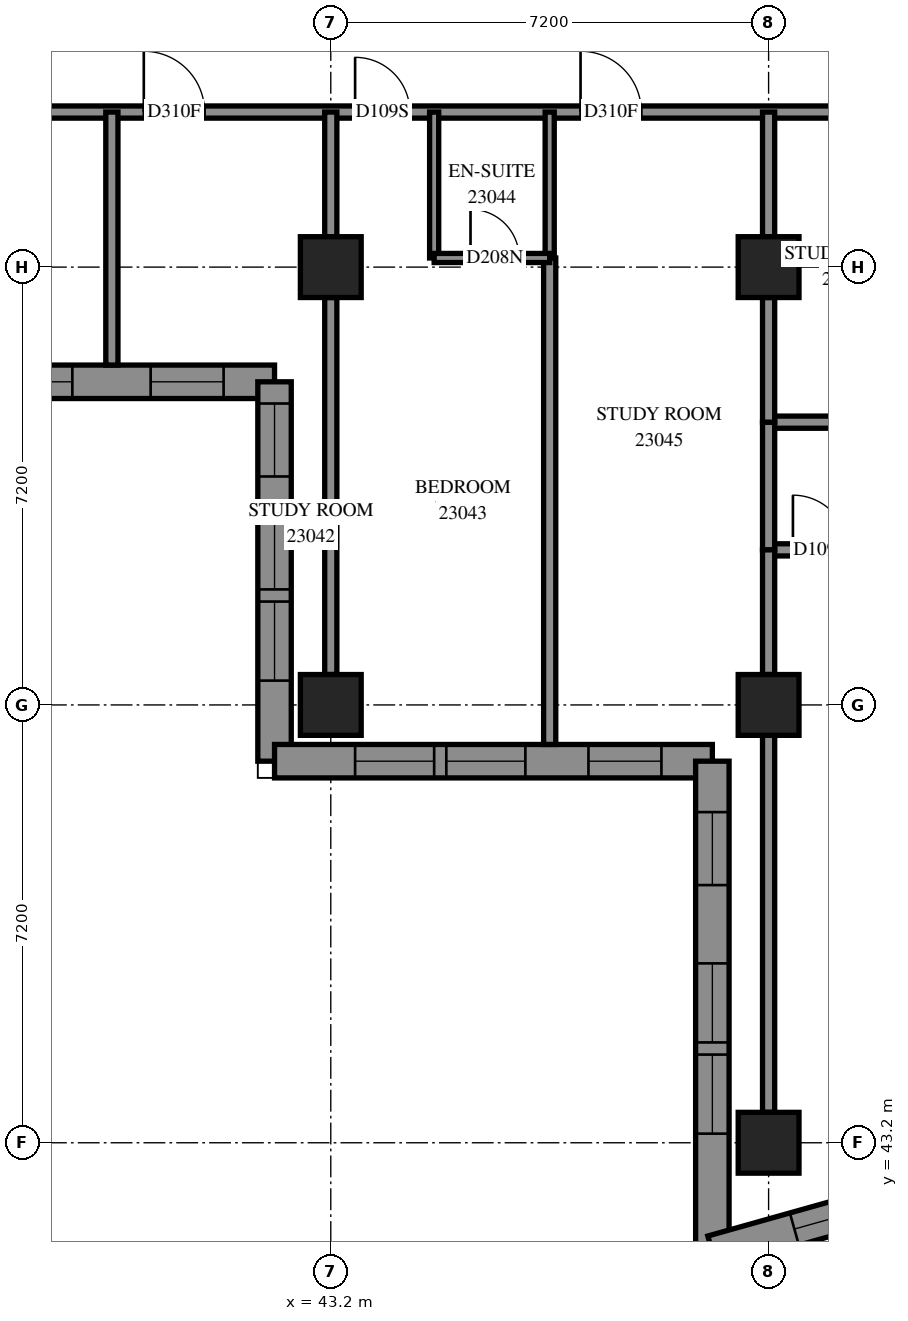
"""IFC4 building model, lengths in metres.
Left out: names, types, materials, properties, quantities, classifications, styles, units other than length and angle.
Written with IfcOpenShell. Run it as: python <this file> out.ifc"""

import sys

from ifc_helpers import new_model, si_unit, direction, frame, frame_2d, origin, origin_2d, place, context, subcontext, project, spatial, polyline, rectangle, outline, extrude, element, fill, save


model = new_model("IFC4")
c1 = context("Model", 3, precision=1e-05, world=origin(), true_north=direction((0.0, 1.0)))
c2 = subcontext(c1, "Body", "Model", "MODEL_VIEW")
j1 = project(units=[si_unit("LENGTHUNIT", "METRE"), si_unit("PLANEANGLEUNIT", "RADIAN")], contexts=[c1])
p1 = place(None, origin())
s1 = spatial("IfcSite", under=j1, at=p1, CompositionType="ELEMENT")
p2 = place(p1, origin())
s2 = spatial("IfcBuilding", under=s1, at=p2, CompositionType="ELEMENT")
p3 = place(p2, frame((0.0, 0.0, 88.0)))
s3 = spatial("IfcBuildingStorey", under=s2, at=p3, CompositionType="ELEMENT", Elevation=88.0)
for number, where, z_axis, x_axis in (
    (1, (43.2, 50.4, 0.0), (0.0, 0.0, 1.0), (1.0, 0.0, 0.0)),
    (2, (43.2, 57.6, 0.0), (0.0, 0.0, 1.0), (1.0, 0.0, 0.0)),
    (3, (50.4, 43.2, 0.0), (0.0, 0.0, 1.0), (1.0, 0.0, 0.0)),
    (4, (50.4, 50.4, 0.0), (0.0, 0.0, 1.0), (1.0, 0.0, 0.0)),
    (5, (50.4, 57.6, 0.0), (0.0, 0.0, 1.0), (1.0, 0.0, 0.0)),
):
    element("IfcColumn", number, at=place(p3, frame(where, z_axis=z_axis, x_axis=x_axis)), inside=s3, PredefinedType="COLUMN", context=c2, shape_type="SweptSolid", body=[
        extrude(rectangle(XDim=1.0, YDim=1.0, at=origin_2d()), origin(), (0.0, 0.0, 1.0), 3.1),
    ])
p4 = place(p3, frame((27.875, 55.714, 0.0), z_axis=(0.0, 0.0, 1.0), x_axis=(1.0, 0.0, 0.0)))
e6 = element("IfcWall", 6, at=p4, inside=s3, PredefinedType="SOLIDWALL", context=c2, shape_type="SweptSolid", body=[
    extrude(outline(polyline([(-0.275, -0.275), (14.125, -0.275), (14.675, 0.275), (0.275, 0.275), (-0.275, -0.275)])), origin(), (0.0, 0.0, 1.0), 3.1),
])
p5 = place(p4, frame((1.175, 0.0, 0.5)))
e7 = element("IfcOpeningElement", 7, at=p5, cuts=e6, PredefinedType="OPENING", context=c2, shape_type="SweptSolid", body=[
    extrude(rectangle(XDim=1.3, YDim=2.45, at=frame_2d((0.65, 1.225))), frame((0.0, 0.285, 0.0), z_axis=(0.0, -1.0, 0.0), x_axis=(1.0, 0.0, 0.0)), (0.0, 0.0, 1.0), 0.57),
])
p6 = place(p4, frame((2.675, 0.0, 0.5)))
e8 = element("IfcOpeningElement", 8, at=p6, cuts=e6, PredefinedType="OPENING", context=c2, shape_type="SweptSolid", body=[
    extrude(rectangle(XDim=1.3, YDim=2.45, at=frame_2d((0.65, 1.225))), frame((0.0, 0.285, 0.0), z_axis=(0.0, -1.0, 0.0), x_axis=(1.0, 0.0, 0.0)), (0.0, 0.0, 1.0), 0.57),
])
p7 = place(p4, frame((4.925, 0.0, 0.5)))
e9 = element("IfcOpeningElement", 9, at=p7, cuts=e6, PredefinedType="OPENING", context=c2, shape_type="SweptSolid", body=[
    extrude(rectangle(XDim=1.3, YDim=2.45, at=frame_2d((0.65, 1.225))), frame((0.0, 0.285, 0.0), z_axis=(0.0, -1.0, 0.0), x_axis=(1.0, 0.0, 0.0)), (0.0, 0.0, 1.0), 0.57),
])
p8 = place(p4, frame((6.425, 0.0, 0.5)))
e10 = element("IfcOpeningElement", 10, at=p8, cuts=e6, PredefinedType="OPENING", context=c2, shape_type="SweptSolid", body=[
    extrude(rectangle(XDim=1.3, YDim=2.45, at=frame_2d((0.65, 1.225))), frame((0.0, 0.285, 0.0), z_axis=(0.0, -1.0, 0.0), x_axis=(1.0, 0.0, 0.0)), (0.0, 0.0, 1.0), 0.57),
])
p9 = place(p4, frame((8.275, 0.0, 0.5)))
e11 = element("IfcOpeningElement", 11, at=p9, cuts=e6, PredefinedType="OPENING", context=c2, shape_type="SweptSolid", body=[
    extrude(rectangle(XDim=1.3, YDim=2.45, at=frame_2d((0.65, 1.225))), frame((0.0, 0.285, 0.0), z_axis=(0.0, -1.0, 0.0), x_axis=(1.0, 0.0, 0.0)), (0.0, 0.0, 1.0), 0.57),
])
p10 = place(p4, frame((9.775, 0.0, 0.5)))
e12 = element("IfcOpeningElement", 12, at=p10, cuts=e6, PredefinedType="OPENING", context=c2, shape_type="SweptSolid", body=[
    extrude(rectangle(XDim=1.3, YDim=2.45, at=frame_2d((0.65, 1.225))), frame((0.0, 0.285, 0.0), z_axis=(0.0, -1.0, 0.0), x_axis=(1.0, 0.0, 0.0)), (0.0, 0.0, 1.0), 0.57),
])
p11 = place(p4, frame((12.363, 0.0, 0.5)))
e13 = element("IfcOpeningElement", 13, at=p11, cuts=e6, PredefinedType="OPENING", context=c2, shape_type="SweptSolid", body=[
    extrude(rectangle(XDim=1.2, YDim=2.45, at=frame_2d((0.6, 1.225))), frame((0.0, 0.285, 0.0), z_axis=(0.0, -1.0, 0.0), x_axis=(1.0, 0.0, 0.0)), (0.0, 0.0, 1.0), 0.57),
])
p12 = place(p3, frame((42.275, 55.714, 0.0), z_axis=(0.0, 0.0, 1.0), x_axis=(0.0, -1.0, 0.0)))
e14 = element("IfcWall", 14, at=p12, inside=s3, PredefinedType="SOLIDWALL", context=c2, shape_type="SweptSolid", body=[
    extrude(outline(polyline([(0.275, -0.275), (6.514, -0.275), (5.964, 0.275), (-0.275, 0.275), (0.275, -0.275)])), origin(), (0.0, 0.0, 1.0), 3.1),
])
p13 = place(p12, frame((2.114, 0.0, 0.5)))
e15 = element("IfcOpeningElement", 15, at=p13, cuts=e14, PredefinedType="OPENING", context=c2, shape_type="SweptSolid", body=[
    extrude(rectangle(XDim=1.3, YDim=2.45, at=frame_2d((0.65, 1.225))), frame((0.0, 0.285, 0.0), z_axis=(0.0, -1.0, 0.0), x_axis=(1.0, 0.0, 0.0)), (0.0, 0.0, 1.0), 0.57),
])
p14 = place(p12, frame((3.614, 0.0, 0.5)))
e16 = element("IfcOpeningElement", 16, at=p14, cuts=e14, PredefinedType="OPENING", context=c2, shape_type="SweptSolid", body=[
    extrude(rectangle(XDim=1.3, YDim=2.45, at=frame_2d((0.65, 1.225))), frame((0.0, 0.285, 0.0), z_axis=(0.0, -1.0, 0.0), x_axis=(1.0, 0.0, 0.0)), (0.0, 0.0, 1.0), 0.57),
])
p15 = place(p12, frame((0.357, 0.0, 0.5)))
e17 = element("IfcOpeningElement", 17, at=p15, cuts=e14, PredefinedType="OPENING", context=c2, shape_type="SweptSolid", body=[
    extrude(rectangle(XDim=1.2, YDim=2.45, at=frame_2d((0.6, 1.225))), frame((0.0, 0.285, 0.0), z_axis=(0.0, -1.0, 0.0), x_axis=(1.0, 0.0, 0.0)), (0.0, 0.0, 1.0), 0.57),
])
p16 = place(p3, frame((42.275, 49.475, 0.0), z_axis=(0.0, 0.0, 1.0), x_axis=(1.0, 0.0, 0.0)))
e18 = element("IfcWall", 18, at=p16, inside=s3, PredefinedType="SOLIDWALL", context=c2, shape_type="SweptSolid", body=[
    extrude(outline(polyline([(-0.275, -0.275), (6.925, -0.275), (7.475, 0.275), (0.275, 0.275), (-0.275, -0.275)])), origin(), (0.0, 0.0, 1.0), 3.1),
])
p17 = place(p16, frame((1.325, 0.0, 0.5)))
e19 = element("IfcOpeningElement", 19, at=p17, cuts=e18, PredefinedType="OPENING", context=c2, shape_type="SweptSolid", body=[
    extrude(rectangle(XDim=1.3, YDim=2.45, at=frame_2d((0.65, 1.225))), frame((0.0, 0.285, 0.0), z_axis=(0.0, -1.0, 0.0), x_axis=(1.0, 0.0, 0.0)), (0.0, 0.0, 1.0), 0.57),
])
p18 = place(p16, frame((2.825, 0.0, 0.5)))
e20 = element("IfcOpeningElement", 20, at=p18, cuts=e18, PredefinedType="OPENING", context=c2, shape_type="SweptSolid", body=[
    extrude(rectangle(XDim=1.3, YDim=2.45, at=frame_2d((0.65, 1.225))), frame((0.0, 0.285, 0.0), z_axis=(0.0, -1.0, 0.0), x_axis=(1.0, 0.0, 0.0)), (0.0, 0.0, 1.0), 0.57),
])
p19 = place(p16, frame((5.162, 0.0, 0.5)))
e21 = element("IfcOpeningElement", 21, at=p19, cuts=e18, PredefinedType="OPENING", context=c2, shape_type="SweptSolid", body=[
    extrude(rectangle(XDim=1.2, YDim=2.45, at=frame_2d((0.6, 1.225))), frame((0.0, 0.285, 0.0), z_axis=(0.0, -1.0, 0.0), x_axis=(1.0, 0.0, 0.0)), (0.0, 0.0, 1.0), 0.57),
])
p20 = place(p3, frame((49.475, 49.475, 0.0), z_axis=(0.0, 0.0, 1.0), x_axis=(0.0, -1.0, 0.0)))
e22 = element("IfcWall", 22, at=p20, inside=s3, PredefinedType="SOLIDWALL", context=c2, shape_type="SweptSolid", body=[
    extrude(outline(polyline([(0.275, -0.275), (8.436, -0.275), (7.71, 0.275), (-0.275, 0.275), (0.275, -0.275)])), origin(), (0.0, 0.0, 1.0), 3.1),
])
p21 = place(p20, frame((3.325, 0.0, 0.5)))
e23 = element("IfcOpeningElement", 23, at=p21, cuts=e22, PredefinedType="OPENING", context=c2, shape_type="SweptSolid", body=[
    extrude(rectangle(XDim=1.3, YDim=2.45, at=frame_2d((0.65, 1.225))), frame((0.0, 0.285, 0.0), z_axis=(0.0, -1.0, 0.0), x_axis=(1.0, 0.0, 0.0)), (0.0, 0.0, 1.0), 0.57),
])
p22 = place(p20, frame((4.825, 0.0, 0.5)))
e24 = element("IfcOpeningElement", 24, at=p22, cuts=e22, PredefinedType="OPENING", context=c2, shape_type="SweptSolid", body=[
    extrude(rectangle(XDim=1.3, YDim=2.45, at=frame_2d((0.65, 1.225))), frame((0.0, 0.285, 0.0), z_axis=(0.0, -1.0, 0.0), x_axis=(1.0, 0.0, 0.0)), (0.0, 0.0, 1.0), 0.57),
])
p23 = place(p20, frame((0.838, 0.0, 0.5)))
e25 = element("IfcOpeningElement", 25, at=p23, cuts=e22, PredefinedType="OPENING", context=c2, shape_type="SweptSolid", body=[
    extrude(rectangle(XDim=1.2, YDim=2.45, at=frame_2d((0.6, 1.225))), frame((0.0, 0.285, 0.0), z_axis=(0.0, -1.0, 0.0), x_axis=(1.0, 0.0, 0.0)), (0.0, 0.0, 1.0), 0.57),
])
p24 = place(p3, frame((49.475, 41.402, 0.0), z_axis=(0.0, 0.0, 1.0), x_axis=(0.9627079474, 0.2705428024, 0.0)))
e26 = element("IfcWall", 26, at=p24, inside=s3, PredefinedType="SOLIDWALL", context=c2, shape_type="SweptSolid", body=[
    extrude(outline(polyline([(-0.363, -0.275), (3.189, -0.275), (3.295, 0.275), (0.363, 0.275), (-0.363, -0.275)])), origin(), (0.0, 0.0, 1.0), 3.1),
])
p25 = place(p24, frame((1.401, 0.0, 0.5)))
e27 = element("IfcOpeningElement", 27, at=p25, cuts=e26, PredefinedType="OPENING", context=c2, shape_type="SweptSolid", body=[
    extrude(rectangle(XDim=1.2, YDim=2.45, at=frame_2d((0.6, 1.225))), frame((0.0, 0.285, 0.0), z_axis=(0.0, -1.0, 0.0), x_axis=(1.0, 0.0, 0.0)), (0.0, 0.0, 1.0), 0.57),
])
p26 = place(p3, frame((28.8, 60.15, 0.0), z_axis=(0.0, 0.0, 1.0), x_axis=(1.0, 0.0, 0.0)))
e28 = element("IfcWall", 28, at=p26, inside=s3, PredefinedType="PARTITIONING", context=c2, shape_type="SweptSolid", body=[
    extrude(rectangle(XDim=24.15, YDim=0.2, at=frame_2d((12.075, 0.0))), origin(), (0.0, 0.0, 1.0), 3.1),
])
p27 = place(p26, frame((11.325, 0.0, 0.0)))
e29 = element("IfcOpeningElement", 29, at=p27, cuts=e28, PredefinedType="OPENING", context=c2, shape_type="SweptSolid", body=[
    extrude(rectangle(XDim=1.0, YDim=2.1, at=frame_2d((0.5, 1.05))), frame((0.0, 0.11, 0.0), z_axis=(0.0, -1.0, 0.0), x_axis=(1.0, 0.0, 0.0)), (0.0, 0.0, 1.0), 0.22),
])
p28 = place(p26, frame((14.8, 0.0, 0.0)))
e30 = element("IfcOpeningElement", 30, at=p28, cuts=e28, PredefinedType="OPENING", context=c2, shape_type="SweptSolid", body=[
    extrude(rectangle(XDim=0.9, YDim=2.1, at=frame_2d((0.45, 1.05))), frame((0.0, 0.11, 0.0), z_axis=(0.0, -1.0, 0.0), x_axis=(1.0, 0.0, 0.0)), (0.0, 0.0, 1.0), 0.22),
])
p29 = place(p26, frame((18.508, 0.0, 0.0)))
e31 = element("IfcOpeningElement", 31, at=p29, cuts=e28, PredefinedType="OPENING", context=c2, shape_type="SweptSolid", body=[
    extrude(rectangle(XDim=1.0, YDim=2.1, at=frame_2d((0.5, 1.05))), frame((0.0, 0.11, 0.0), z_axis=(0.0, -1.0, 0.0), x_axis=(1.0, 0.0, 0.0)), (0.0, 0.0, 1.0), 0.22),
])
p30 = place(p26, frame((22.882, 0.0, 0.0)))
e32 = element("IfcOpeningElement", 32, at=p30, cuts=e28, PredefinedType="OPENING", context=c2, shape_type="SweptSolid", body=[
    extrude(rectangle(XDim=1.0, YDim=2.1, at=frame_2d((0.5, 1.05))), frame((0.0, 0.11, 0.0), z_axis=(0.0, -1.0, 0.0), x_axis=(1.0, 0.0, 0.0)), (0.0, 0.0, 1.0), 0.22),
])
p31 = place(p3, frame((46.8, 49.75, 0.0), z_axis=(0.0, 0.0, 1.0), x_axis=(0.0, 1.0, 0.0)))
e33 = element("IfcWall", 33, at=p31, inside=s3, PredefinedType="PARTITIONING", context=c2, shape_type="SweptSolid", body=[
    extrude(rectangle(XDim=8.0, YDim=0.2, at=frame_2d((4.0, 0.0))), origin(), (0.0, 0.0, 1.0), 3.1),
])
for number, where, z_axis, x_axis in (
    (34, (43.2, 50.9, 0.0), (0.0, 0.0, 1.0), (0.0, 1.0, 0.0)),
    (35, (50.4, 43.7, 0.0), (0.0, 0.0, 1.0), (0.0, 1.0, 0.0)),
):
    element("IfcWall", number, at=place(p3, frame(where, z_axis=z_axis, x_axis=x_axis)), inside=s3, PredefinedType="PARTITIONING", context=c2, shape_type="SweptSolid", body=[
        extrude(rectangle(XDim=6.2, YDim=0.2, at=frame_2d((3.1, 0.0))), origin(), (0.0, 0.0, 1.0), 2.6),
    ])
p32 = place(p3, frame((50.4, 52.95, 0.0), z_axis=(0.0, 0.0, 1.0), x_axis=(1.0, 0.0, 0.0)))
e36 = element("IfcWall", 36, at=p32, inside=s3, PredefinedType="PARTITIONING", context=c2, shape_type="SweptSolid", body=[
    extrude(rectangle(XDim=4.9, YDim=0.2, at=frame_2d((2.45, 0.0))), origin(), (0.0, 0.0, 1.0), 3.1),
])
p33 = place(p32, frame((0.4, 0.0, 0.0)))
e37 = element("IfcOpeningElement", 37, at=p33, cuts=e36, PredefinedType="OPENING", context=c2, shape_type="SweptSolid", body=[
    extrude(rectangle(XDim=0.9, YDim=2.1, at=frame_2d((0.45, 1.05))), frame((0.0, 0.11, 0.0), z_axis=(0.0, -1.0, 0.0), x_axis=(1.0, 0.0, 0.0)), (0.0, 0.0, 1.0), 0.22),
])
p34 = place(p3, frame((39.6, 55.989, 0.0), z_axis=(0.0, 0.0, 1.0), x_axis=(0.0, 1.0, 0.0)))
e38 = element("IfcWall", 38, at=p34, inside=s3, PredefinedType="PARTITIONING", context=c2, shape_type="SweptSolid", body=[
    extrude(rectangle(XDim=4.161, YDim=0.2, at=frame_2d((2.08, 0.0))), origin(), (0.0, 0.0, 1.0), 3.1),
])
p35 = place(p3, frame((50.4, 55.05, 0.0), z_axis=(0.0, 0.0, 1.0), x_axis=(1.0, 0.0, 0.0)))
e39 = element("IfcWall", 39, at=p35, inside=s3, PredefinedType="PARTITIONING", context=c2, shape_type="SweptSolid", body=[
    extrude(rectangle(XDim=2.55, YDim=0.2, at=frame_2d((1.275, 0.0))), origin(), (0.0, 0.0, 1.0), 3.1),
])
for number, where, z_axis, x_axis in (
    (40, (44.9, 57.75, 0.0), (0.0, 0.0, 1.0), (0.0, 1.0, 0.0)),
    (41, (46.8, 57.75, 0.0), (0.0, 0.0, 1.0), (0.0, 1.0, 0.0)),
):
    element("IfcWall", number, at=place(p3, frame(where, z_axis=z_axis, x_axis=x_axis)), inside=s3, PredefinedType="PARTITIONING", context=c2, shape_type="SweptSolid", body=[
        extrude(rectangle(XDim=2.4, YDim=0.15, at=frame_2d((1.2, 0.0))), origin(), (0.0, 0.0, 1.0), 3.1),
    ])
p36 = place(p3, frame((50.4, 52.95, 0.0), z_axis=(0.0, 0.0, 1.0), x_axis=(0.0, 1.0, 0.0)))
e42 = element("IfcWall", 42, at=p36, inside=s3, PredefinedType="PARTITIONING", context=c2, shape_type="SweptSolid", body=[
    extrude(rectangle(XDim=2.1, YDim=0.2, at=frame_2d((1.05, 0.0))), origin(), (0.0, 0.0, 1.0), 3.1),
])
for number, where, z_axis, x_axis in (
    (43, (50.4, 50.9, 0.0), (0.0, 0.0, 1.0), (0.0, 1.0, 0.0)),
    (44, (50.4, 55.05, 0.0), (0.0, 0.0, 1.0), (0.0, 1.0, 0.0)),
    (45, (43.2, 58.1, 0.0), (0.0, 0.0, 1.0), (0.0, 1.0, 0.0)),
    (46, (50.4, 58.1, 0.0), (0.0, 0.0, 1.0), (0.0, 1.0, 0.0)),
):
    element("IfcWall", number, at=place(p3, frame(where, z_axis=z_axis, x_axis=x_axis)), inside=s3, PredefinedType="PARTITIONING", context=c2, shape_type="SweptSolid", body=[
        extrude(rectangle(XDim=2.05, YDim=0.2, at=frame_2d((1.025, 0.0))), origin(), (0.0, 0.0, 1.0), 3.1),
    ])
p37 = place(p3, frame((44.9, 57.75, 0.0), z_axis=(0.0, 0.0, 1.0), x_axis=(1.0, 0.0, 0.0)))
e47 = element("IfcWall", 47, at=p37, inside=s3, PredefinedType="PARTITIONING", context=c2, shape_type="SweptSolid", body=[
    extrude(rectangle(XDim=1.9, YDim=0.15, at=frame_2d((0.95, 0.0))), origin(), (0.0, 0.0, 1.0), 3.1),
])
p38 = place(p37, frame((0.598, 0.0, 0.0)))
e48 = element("IfcOpeningElement", 48, at=p38, cuts=e47, PredefinedType="OPENING", context=c2, shape_type="SweptSolid", body=[
    extrude(rectangle(XDim=0.8, YDim=2.1, at=frame_2d((0.4, 1.05))), frame((0.0, 0.085, 0.0), z_axis=(0.0, -1.0, 0.0), x_axis=(1.0, 0.0, 0.0)), (0.0, 0.0, 1.0), 0.17),
])
p39 = place(p10, origin())
e49 = element("IfcWindow", 49, at=p39, inside=s3, PartitioningType="SINGLE_PANEL", PredefinedType="WINDOW", context=c2, shape_type="SweptSolid", body=[
    extrude(rectangle(XDim=1.3, YDim=2.45, at=frame_2d((0.65, 1.225))), frame((0.0, 0.155, 0.0), z_axis=(0.0, -1.0, 0.0), x_axis=(1.0, 0.0, 0.0)), (0.0, 0.0, 1.0), 0.06),
])
fill(e12, e49)
p40 = place(p11, origin())
e50 = element("IfcWindow", 50, at=p40, inside=s3, PartitioningType="SINGLE_PANEL", PredefinedType="WINDOW", context=c2, shape_type="SweptSolid", body=[
    extrude(rectangle(XDim=1.2, YDim=2.45, at=frame_2d((0.6, 1.225))), frame((0.0, 0.155, 0.0), z_axis=(0.0, -1.0, 0.0), x_axis=(1.0, 0.0, 0.0)), (0.0, 0.0, 1.0), 0.06),
])
fill(e13, e50)
p41 = place(p13, origin())
e51 = element("IfcWindow", 51, at=p41, inside=s3, PartitioningType="SINGLE_PANEL", PredefinedType="WINDOW", context=c2, shape_type="SweptSolid", body=[
    extrude(rectangle(XDim=1.3, YDim=2.45, at=frame_2d((0.65, 1.225))), frame((0.0, 0.155, 0.0), z_axis=(0.0, -1.0, 0.0), x_axis=(1.0, 0.0, 0.0)), (0.0, 0.0, 1.0), 0.06),
])
fill(e15, e51)
p42 = place(p14, origin())
e52 = element("IfcWindow", 52, at=p42, inside=s3, PartitioningType="SINGLE_PANEL", PredefinedType="WINDOW", context=c2, shape_type="SweptSolid", body=[
    extrude(rectangle(XDim=1.3, YDim=2.45, at=frame_2d((0.65, 1.225))), frame((0.0, 0.155, 0.0), z_axis=(0.0, -1.0, 0.0), x_axis=(1.0, 0.0, 0.0)), (0.0, 0.0, 1.0), 0.06),
])
fill(e16, e52)
p43 = place(p15, origin())
e53 = element("IfcWindow", 53, at=p43, inside=s3, PartitioningType="SINGLE_PANEL", PredefinedType="WINDOW", context=c2, shape_type="SweptSolid", body=[
    extrude(rectangle(XDim=1.2, YDim=2.45, at=frame_2d((0.6, 1.225))), frame((0.0, 0.155, 0.0), z_axis=(0.0, -1.0, 0.0), x_axis=(1.0, 0.0, 0.0)), (0.0, 0.0, 1.0), 0.06),
])
fill(e17, e53)
p44 = place(p17, origin())
e54 = element("IfcWindow", 54, at=p44, inside=s3, PartitioningType="SINGLE_PANEL", PredefinedType="WINDOW", context=c2, shape_type="SweptSolid", body=[
    extrude(rectangle(XDim=1.3, YDim=2.45, at=frame_2d((0.65, 1.225))), frame((0.0, 0.155, 0.0), z_axis=(0.0, -1.0, 0.0), x_axis=(1.0, 0.0, 0.0)), (0.0, 0.0, 1.0), 0.06),
])
fill(e19, e54)
p45 = place(p18, origin())
e55 = element("IfcWindow", 55, at=p45, inside=s3, PartitioningType="SINGLE_PANEL", PredefinedType="WINDOW", context=c2, shape_type="SweptSolid", body=[
    extrude(rectangle(XDim=1.3, YDim=2.45, at=frame_2d((0.65, 1.225))), frame((0.0, 0.155, 0.0), z_axis=(0.0, -1.0, 0.0), x_axis=(1.0, 0.0, 0.0)), (0.0, 0.0, 1.0), 0.06),
])
fill(e20, e55)
p46 = place(p19, origin())
e56 = element("IfcWindow", 56, at=p46, inside=s3, PartitioningType="SINGLE_PANEL", PredefinedType="WINDOW", context=c2, shape_type="SweptSolid", body=[
    extrude(rectangle(XDim=1.2, YDim=2.45, at=frame_2d((0.6, 1.225))), frame((0.0, 0.155, 0.0), z_axis=(0.0, -1.0, 0.0), x_axis=(1.0, 0.0, 0.0)), (0.0, 0.0, 1.0), 0.06),
])
fill(e21, e56)
p47 = place(p21, origin())
e57 = element("IfcWindow", 57, at=p47, inside=s3, PartitioningType="SINGLE_PANEL", PredefinedType="WINDOW", context=c2, shape_type="SweptSolid", body=[
    extrude(rectangle(XDim=1.3, YDim=2.45, at=frame_2d((0.65, 1.225))), frame((0.0, 0.155, 0.0), z_axis=(0.0, -1.0, 0.0), x_axis=(1.0, 0.0, 0.0)), (0.0, 0.0, 1.0), 0.06),
])
fill(e23, e57)
p48 = place(p22, origin())
e58 = element("IfcWindow", 58, at=p48, inside=s3, PartitioningType="SINGLE_PANEL", PredefinedType="WINDOW", context=c2, shape_type="SweptSolid", body=[
    extrude(rectangle(XDim=1.3, YDim=2.45, at=frame_2d((0.65, 1.225))), frame((0.0, 0.155, 0.0), z_axis=(0.0, -1.0, 0.0), x_axis=(1.0, 0.0, 0.0)), (0.0, 0.0, 1.0), 0.06),
])
fill(e24, e58)
p49 = place(p23, origin())
e59 = element("IfcWindow", 59, at=p49, inside=s3, PartitioningType="SINGLE_PANEL", PredefinedType="WINDOW", context=c2, shape_type="SweptSolid", body=[
    extrude(rectangle(XDim=1.2, YDim=2.45, at=frame_2d((0.6, 1.225))), frame((0.0, 0.155, 0.0), z_axis=(0.0, -1.0, 0.0), x_axis=(1.0, 0.0, 0.0)), (0.0, 0.0, 1.0), 0.06),
])
fill(e25, e59)
p50 = place(p25, origin())
e60 = element("IfcWindow", 60, at=p50, inside=s3, PartitioningType="SINGLE_PANEL", PredefinedType="WINDOW", context=c2, shape_type="SweptSolid", body=[
    extrude(rectangle(XDim=1.2, YDim=2.45, at=frame_2d((0.6, 1.225))), frame((0.0, 0.155, 0.0), z_axis=(0.0, -1.0, 0.0), x_axis=(1.0, 0.0, 0.0)), (0.0, 0.0, 1.0), 0.06),
])
fill(e27, e60)
p51 = place(p27, origin())
e61 = element("IfcDoor", 61, at=p51, inside=s3, OperationType="SINGLE_SWING_RIGHT", PredefinedType="DOOR", context=c2, shape_type="SweptSolid", body=[
    extrude(rectangle(XDim=1.0, YDim=2.1, at=frame_2d((0.5, 1.05))), frame((0.0, 0.025, 0.0), z_axis=(0.0, -1.0, 0.0), x_axis=(1.0, 0.0, 0.0)), (0.0, 0.0, 1.0), 0.05),
])
fill(e29, e61)
p52 = place(p28, origin())
e62 = element("IfcDoor", 62, at=p52, inside=s3, OperationType="SINGLE_SWING_LEFT", PredefinedType="DOOR", context=c2, shape_type="SweptSolid", body=[
    extrude(rectangle(XDim=0.9, YDim=2.1, at=frame_2d((0.45, 1.05))), frame((0.0, 0.025, 0.0), z_axis=(0.0, -1.0, 0.0), x_axis=(1.0, 0.0, 0.0)), (0.0, 0.0, 1.0), 0.05),
])
fill(e30, e62)
p53 = place(p38, origin())
e63 = element("IfcDoor", 63, at=p53, inside=s3, OperationType="SINGLE_SWING_RIGHT", PredefinedType="DOOR", context=c2, shape_type="SweptSolid", body=[
    extrude(rectangle(XDim=0.8, YDim=2.1, at=frame_2d((0.4, 1.05))), frame((0.0, 0.025, 0.0), z_axis=(0.0, -1.0, 0.0), x_axis=(1.0, 0.0, 0.0)), (0.0, 0.0, 1.0), 0.05),
])
fill(e48, e63)
p54 = place(p29, origin())
e64 = element("IfcDoor", 64, at=p54, inside=s3, OperationType="SINGLE_SWING_RIGHT", PredefinedType="DOOR", context=c2, shape_type="SweptSolid", body=[
    extrude(rectangle(XDim=1.0, YDim=2.1, at=frame_2d((0.5, 1.05))), frame((0.0, 0.025, 0.0), z_axis=(0.0, -1.0, 0.0), x_axis=(1.0, 0.0, 0.0)), (0.0, 0.0, 1.0), 0.05),
])
fill(e31, e64)
p55 = place(p33, origin())
e65 = element("IfcDoor", 65, at=p55, inside=s3, OperationType="SINGLE_SWING_LEFT", PredefinedType="DOOR", context=c2, shape_type="SweptSolid", body=[
    extrude(rectangle(XDim=0.9, YDim=2.1, at=frame_2d((0.45, 1.05))), frame((0.0, 0.025, 0.0), z_axis=(0.0, -1.0, 0.0), x_axis=(1.0, 0.0, 0.0)), (0.0, 0.0, 1.0), 0.05),
])
fill(e37, e65)
save(model, sys.argv[1])
